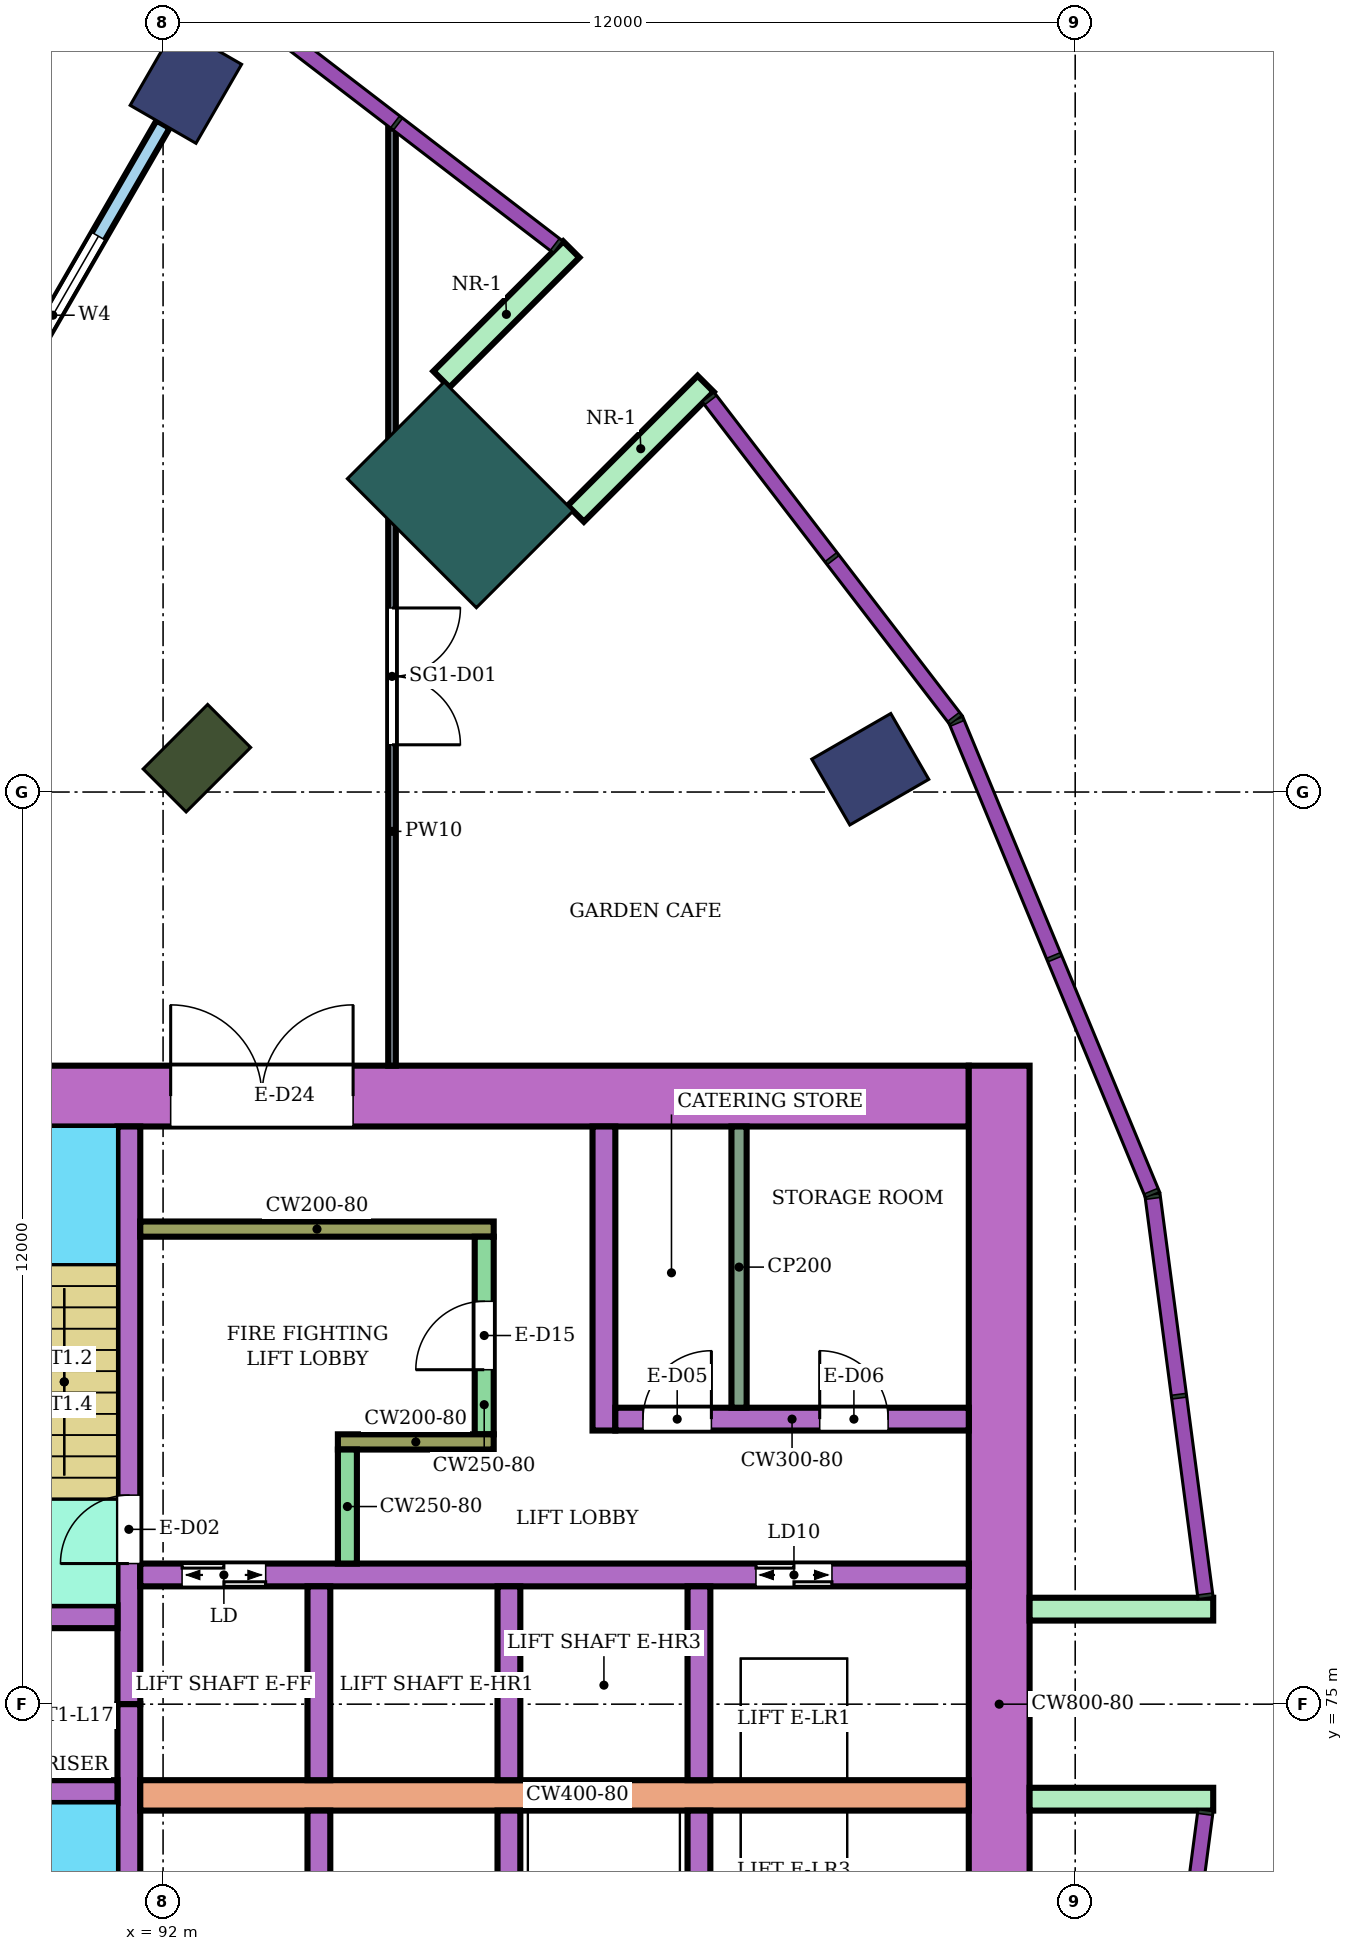
"""IFC4 building model, lengths in metres.
Left out: names, types, materials, properties, quantities, classifications, styles, units other than length and angle.
Written with IfcOpenShell. Run it as: python <this file> out.ifc"""

import sys

from ifc_helpers import new_model, si_unit, direction, frame, frame_2d, origin, origin_2d, place, context, subcontext, project, spatial, rectangle, extrude, element, fill, save


model = new_model("IFC4")
c1 = context("Model", 3, precision=1e-05, world=origin(), true_north=direction((0.0, 1.0)))
c2 = subcontext(c1, "Body", "Model", "MODEL_VIEW")
j1 = project(units=[si_unit("LENGTHUNIT", "METRE"), si_unit("PLANEANGLEUNIT", "RADIAN")], contexts=[c1])
p1 = place(None, origin())
s1 = spatial("IfcSite", under=j1, at=p1, CompositionType="ELEMENT")
p2 = place(p1, origin())
s2 = spatial("IfcBuilding", under=s1, at=p2, CompositionType="ELEMENT")
p3 = place(p2, frame((0.0, 0.0, 74.4)))
s3 = spatial("IfcBuildingStorey", under=s2, at=p3, CompositionType="ELEMENT", Elevation=74.4)
for number, where, z_axis, x_axis in (
    (1, (101.304, 87.3, 0.0), (0.0, 0.0, 1.0), (0.866, 0.5, 0.0)),
    (2, (92.3, 96.304, 0.0), (0.0, 0.0, 1.0), (0.5, 0.866, 0.0)),
):
    element("IfcColumn", number, at=place(p3, frame(where, z_axis=z_axis, x_axis=x_axis)), inside=s3, PredefinedType="COLUMN", context=c2, shape_type="SweptSolid", body=[
        extrude(rectangle(XDim=1.2, YDim=1.0, at=origin_2d()), origin(), (0.0, 0.0, 1.0), 8.0),
    ])
p4 = place(p3, frame((92.445, 87.445, 0.0), z_axis=(0.0, 0.0, 1.0), x_axis=(0.707106781187, 0.707106781187, 0.0)))
e3 = element("IfcColumn", 3, at=p4, inside=s3, PredefinedType="COLUMN", context=c2, shape_type="SweptSolid", body=[
    extrude(rectangle(XDim=1.2, YDim=0.8, at=origin_2d()), origin(), (0.0, 0.0, 1.0), 8.0),
])
p5 = place(p3, frame((95.91, 90.91, 0.0), z_axis=(0.0, 0.0, 1.0), x_axis=(0.707106781187, 0.707106781187, 0.0)))
e4 = element("IfcColumn", 4, at=p5, inside=s3, PredefinedType="COLUMN", context=c2, shape_type="SweptSolid", body=[
    extrude(rectangle(XDim=1.8, YDim=2.4, at=origin_2d()), origin(), (0.0, 0.0, 1.0), 8.0),
])
p6 = place(p3, frame((87.9, 83.0, 0.0), z_axis=(0.0, 0.0, 1.0), x_axis=(1.0, 0.0, 0.0)))
e5 = element("IfcWall", 5, at=p6, inside=s3, PredefinedType="SHEAR", context=c2, shape_type="SweptSolid", body=[
    extrude(rectangle(XDim=14.7, YDim=0.8, at=frame_2d((7.35, 0.0))), origin(), (0.0, 0.0, 1.0), 7.68),
])
p7 = place(p6, frame((4.2, 0.0, 0.0)))
e6 = element("IfcOpeningElement", 6, at=p7, cuts=e5, PredefinedType="OPENING", context=c2, shape_type="SweptSolid", body=[
    extrude(rectangle(XDim=2.4, YDim=2.4, at=frame_2d((1.2, 1.2))), frame((0.0, 0.41, 0.0), z_axis=(0.0, -1.0, 0.0), x_axis=(1.0, 0.0, 0.0)), (0.0, 0.0, 1.0), 0.82),
])
p8 = place(p3, frame((103.0, 66.6, 0.0), z_axis=(0.0, 0.0, 1.0), x_axis=(0.0, 1.0, 0.0)))
e7 = element("IfcWall", 7, at=p8, inside=s3, PredefinedType="SHEAR", context=c2, shape_type="SweptSolid", body=[
    extrude(rectangle(XDim=16.8, YDim=0.8, at=frame_2d((8.4, 0.0))), origin(), (0.0, 0.0, 1.0), 7.68),
])
p9 = place(p3, frame((91.55, 75.0, 0.0), z_axis=(0.0, 0.0, 1.0), x_axis=(0.0, 1.0, 0.0)))
e8 = element("IfcWall", 8, at=p9, inside=s3, PredefinedType="SHEAR", context=c2, shape_type="SweptSolid", body=[
    extrude(rectangle(XDim=7.6, YDim=0.3, at=frame_2d((3.8, 0.0))), origin(), (0.0, 0.0, 1.0), 7.68),
])
p10 = place(p9, frame((1.85, 0.0, 0.0)))
e9 = element("IfcOpeningElement", 9, at=p10, cuts=e8, PredefinedType="OPENING", context=c2, shape_type="SweptSolid", body=[
    extrude(rectangle(XDim=0.9, YDim=2.1, at=frame_2d((0.45, 1.05))), frame((0.0, 0.16, 0.0), z_axis=(0.0, -1.0, 0.0), x_axis=(1.0, 0.0, 0.0)), (0.0, 0.0, 1.0), 0.32),
])
p11 = place(p3, frame((91.55, 67.4, 0.0), z_axis=(0.0, 0.0, 1.0), x_axis=(0.0, 1.0, 0.0)))
e10 = element("IfcWall", 10, at=p11, inside=s3, PredefinedType="SHEAR", context=c2, shape_type="SweptSolid", body=[
    extrude(rectangle(XDim=7.6, YDim=0.3, at=frame_2d((3.8, 0.0))), origin(), (0.0, 0.0, 1.0), 7.68),
])
p12 = place(p11, frame((0.25, 0.0, 0.0)))
e11 = element("IfcOpeningElement", 11, at=p12, cuts=e10, PredefinedType="OPENING", context=c2, shape_type="SweptSolid", body=[
    extrude(rectangle(XDim=0.9, YDim=2.1, at=frame_2d((0.45, 1.05))), frame((0.0, 0.16, 0.0), z_axis=(0.0, -1.0, 0.0), x_axis=(1.0, 0.0, 0.0)), (0.0, 0.0, 1.0), 0.32),
])
p13 = place(p3, frame((88.35, 76.15, 0.0), z_axis=(0.0, 0.0, 1.0), x_axis=(1.0, 0.0, 0.0)))
e12 = element("IfcWall", 12, at=p13, inside=s3, PredefinedType="SHEAR", context=c2, shape_type="SweptSolid", body=[
    extrude(rectangle(XDim=3.05, YDim=0.3, at=frame_2d((1.525, 0.0))), origin(), (0.0, 0.0, 1.0), 7.68),
])
p14 = place(p13, frame((1.1, 0.0, 0.0)))
e13 = element("IfcOpeningElement", 13, at=p14, cuts=e12, PredefinedType="OPENING", context=c2, shape_type="SweptSolid", body=[
    extrude(rectangle(XDim=0.7, YDim=2.0, at=frame_2d((0.35, 1.0))), frame((0.0, 0.16, 0.0), z_axis=(0.0, -1.0, 0.0), x_axis=(1.0, 0.0, 0.0)), (0.0, 0.0, 1.0), 0.32),
])
p15 = place(p3, frame((88.35, 73.85, 0.0), z_axis=(0.0, 0.0, 1.0), x_axis=(1.0, 0.0, 0.0)))
e14 = element("IfcWall", 14, at=p15, inside=s3, PredefinedType="SHEAR", context=c2, shape_type="SweptSolid", body=[
    extrude(rectangle(XDim=3.05, YDim=0.3, at=frame_2d((1.525, 0.0))), origin(), (0.0, 0.0, 1.0), 7.68),
])
p16 = place(p3, frame((91.7, 76.7, 0.0), z_axis=(0.0, 0.0, 1.0), x_axis=(1.0, 0.0, 0.0)))
e15 = element("IfcWall", 15, at=p16, inside=s3, PredefinedType="SHEAR", context=c2, shape_type="SweptSolid", body=[
    extrude(rectangle(XDim=10.9, YDim=0.3, at=frame_2d((5.45, 0.0))), origin(), (0.0, 0.0, 1.0), 7.68),
])
p17 = place(p16, frame((0.55, 0.0, 0.0)))
e16 = element("IfcOpeningElement", 16, at=p17, cuts=e15, PredefinedType="OPENING", context=c2, shape_type="SweptSolid", body=[
    extrude(rectangle(XDim=1.1, YDim=2.1, at=frame_2d((0.55, 1.05))), frame((0.0, 0.16, 0.0), z_axis=(0.0, -1.0, 0.0), x_axis=(1.0, 0.0, 0.0)), (0.0, 0.0, 1.0), 0.32),
])
p18 = place(p16, frame((8.1, 0.0, 0.0)))
e17 = element("IfcOpeningElement", 17, at=p18, cuts=e15, PredefinedType="OPENING", context=c2, shape_type="SweptSolid", body=[
    extrude(rectangle(XDim=1.0, YDim=2.1, at=frame_2d((0.5, 1.05))), frame((0.0, 0.16, 0.0), z_axis=(0.0, -1.0, 0.0), x_axis=(1.0, 0.0, 0.0)), (0.0, 0.0, 1.0), 0.32),
])
p19 = place(p3, frame((91.7, 73.8, 0.0), z_axis=(0.0, 0.0, 1.0), x_axis=(1.0, 0.0, 0.0)))
e18 = element("IfcWall", 18, at=p19, inside=s3, PredefinedType="SHEAR", context=c2, shape_type="SweptSolid", body=[
    extrude(rectangle(XDim=10.9, YDim=0.4, at=frame_2d((5.45, 0.0))), origin(), (0.0, 0.0, 1.0), 7.68),
])
for number, where, z_axis, x_axis in (
    (19, (94.05, 74.0, 0.0), (0.0, 0.0, 1.0), (0.0, 1.0, 0.0)),
    (20, (96.55, 74.0, 0.0), (0.0, 0.0, 1.0), (0.0, 1.0, 0.0)),
    (21, (99.05, 74.0, 0.0), (0.0, 0.0, 1.0), (0.0, 1.0, 0.0)),
    (22, (94.05, 71.05, 0.0), (0.0, 0.0, 1.0), (0.0, 1.0, 0.0)),
    (23, (96.55, 71.05, 0.0), (0.0, 0.0, 1.0), (0.0, 1.0, 0.0)),
    (24, (99.05, 71.05, 0.0), (0.0, 0.0, 1.0), (0.0, 1.0, 0.0)),
):
    element("IfcWall", number, at=place(p3, frame(where, z_axis=z_axis, x_axis=x_axis)), inside=s3, PredefinedType="SHEAR", context=c2, shape_type="SweptSolid", body=[
        extrude(rectangle(XDim=2.55, YDim=0.3, at=frame_2d((1.275, 0.0))), origin(), (0.0, 0.0, 1.0), 7.68),
    ])
p20 = place(p3, frame((91.7, 81.25, 0.0), z_axis=(0.0, 0.0, 1.0), x_axis=(1.0, 0.0, 0.0)))
e25 = element("IfcWall", 25, at=p20, inside=s3, PredefinedType="SHEAR", context=c2, shape_type="SweptSolid", body=[
    extrude(rectangle(XDim=4.65, YDim=0.2, at=frame_2d((2.325, 0.0))), origin(), (0.0, 0.0, 1.0), 7.68),
])
p21 = place(p3, frame((96.225, 78.55, 0.0), z_axis=(0.0, 0.0, 1.0), x_axis=(0.0, 1.0, 0.0)))
e26 = element("IfcWall", 26, at=p21, inside=s3, PredefinedType="SHEAR", context=c2, shape_type="SweptSolid", body=[
    extrude(rectangle(XDim=2.6, YDim=0.25, at=frame_2d((1.3, 0.0))), origin(), (0.0, 0.0, 1.0), 7.68),
])
p22 = place(p21, frame((0.85, 0.0, 0.0)))
e27 = element("IfcOpeningElement", 27, at=p22, cuts=e26, PredefinedType="OPENING", context=c2, shape_type="SweptSolid", body=[
    extrude(rectangle(XDim=0.9, YDim=2.1, at=frame_2d((0.45, 1.05))), frame((0.0, 0.135, 0.0), z_axis=(0.0, -1.0, 0.0), x_axis=(1.0, 0.0, 0.0)), (0.0, 0.0, 1.0), 0.27),
])
p23 = place(p3, frame((94.3, 78.45, 0.0), z_axis=(0.0, 0.0, 1.0), x_axis=(1.0, 0.0, 0.0)))
e28 = element("IfcWall", 28, at=p23, inside=s3, PredefinedType="SHEAR", context=c2, shape_type="SweptSolid", body=[
    extrude(rectangle(XDim=2.05, YDim=0.2, at=frame_2d((1.025, 0.0))), origin(), (0.0, 0.0, 1.0), 7.68),
])
p24 = place(p3, frame((94.425, 76.85, 0.0), z_axis=(0.0, 0.0, 1.0), x_axis=(0.0, 1.0, 0.0)))
e29 = element("IfcWall", 29, at=p24, inside=s3, PredefinedType="SHEAR", context=c2, shape_type="SweptSolid", body=[
    extrude(rectangle(XDim=1.5, YDim=0.25, at=frame_2d((0.75, 0.0))), origin(), (0.0, 0.0, 1.0), 7.68),
])
p25 = place(p3, frame((97.8, 78.6, 0.0), z_axis=(0.0, 0.0, 1.0), x_axis=(0.0, 1.0, 0.0)))
e30 = element("IfcWall", 30, at=p25, inside=s3, PredefinedType="SHEAR", context=c2, shape_type="SweptSolid", body=[
    extrude(rectangle(XDim=4.0, YDim=0.3, at=frame_2d((2.0, 0.0))), origin(), (0.0, 0.0, 1.0), 7.68),
])
p26 = place(p3, frame((97.95, 78.75, 0.0), z_axis=(0.0, 0.0, 1.0), x_axis=(1.0, 0.0, 0.0)))
e31 = element("IfcWall", 31, at=p26, inside=s3, PredefinedType="SHEAR", context=c2, shape_type="SweptSolid", body=[
    extrude(rectangle(XDim=4.65, YDim=0.3, at=frame_2d((2.325, 0.0))), origin(), (0.0, 0.0, 1.0), 7.68),
])
p27 = place(p26, frame((0.364, 0.0, 0.0)))
e32 = element("IfcOpeningElement", 32, at=p27, cuts=e31, PredefinedType="OPENING", context=c2, shape_type="SweptSolid", body=[
    extrude(rectangle(XDim=0.9, YDim=2.1, at=frame_2d((0.45, 1.05))), frame((0.0, 0.16, 0.0), z_axis=(0.0, -1.0, 0.0), x_axis=(1.0, 0.0, 0.0)), (0.0, 0.0, 1.0), 0.32),
])
p28 = place(p26, frame((2.689, 0.0, 0.0)))
e33 = element("IfcOpeningElement", 33, at=p28, cuts=e31, PredefinedType="OPENING", context=c2, shape_type="SweptSolid", body=[
    extrude(rectangle(XDim=0.9, YDim=2.1, at=frame_2d((0.45, 1.05))), frame((0.0, 0.16, 0.0), z_axis=(0.0, -1.0, 0.0), x_axis=(1.0, 0.0, 0.0)), (0.0, 0.0, 1.0), 0.32),
])
for number, where, z_axis, x_axis in (
    (34, (103.4, 73.75, 0.0), (0.0, 0.0, 1.0), (1.0, 0.0, 0.0)),
    (35, (103.4, 76.25, 0.0), (0.0, 0.0, 1.0), (1.0, 0.0, 0.0)),
    (36, (97.43, 90.662, 0.0), (0.0, 0.0, 1.0), (0.707, 0.707, 0.0)),
    (37, (95.662, 92.43, 0.0), (0.0, 0.0, 1.0), (0.707, 0.707, 0.0)),
):
    element("IfcWall", number, at=place(p3, frame(where, z_axis=z_axis, x_axis=x_axis)), inside=s3, PredefinedType="NOTDEFINED", context=c2, shape_type="SweptSolid", body=[
        extrude(rectangle(XDim=2.416, YDim=0.3, at=frame_2d((1.208, 0.0))), origin(), (0.0, 0.0, 1.0), 8.0),
    ])
p29 = place(p3, frame((89.1, 90.762, 0.0), z_axis=(0.0, 0.0, 1.0), x_axis=(0.499987231761, 0.866032775405, 0.0)))
e38 = element("IfcWall", 38, at=p29, inside=s3, PredefinedType="NOTDEFINED", context=c2, shape_type="SweptSolid", body=[
    extrude(rectangle(XDim=5.8, YDim=0.2, at=frame_2d((2.9, 0.0))), origin(), (0.0, 0.0, 1.0), 8.0),
])
p30 = place(p29, frame((1.7, 0.0, 0.3)))
e39 = element("IfcOpeningElement", 39, at=p30, cuts=e38, PredefinedType="OPENING", context=c2, shape_type="SweptSolid", body=[
    extrude(rectangle(XDim=2.4, YDim=3.6, at=frame_2d((1.2, 1.8))), frame((0.0, 0.11, 0.0), z_axis=(0.0, -1.0, 0.0), x_axis=(1.0, 0.0, 0.0)), (0.0, 0.0, 1.0), 0.22),
])
p31 = place(p3, frame((95.012, 83.4, 0.0), z_axis=(0.0, 0.0, 1.0), x_axis=(0.0, 1.0, 0.0)))
e40 = element("IfcWall", 40, at=p31, inside=s3, PredefinedType="PARTITIONING", context=c2, shape_type="SweptSolid", body=[
    extrude(rectangle(XDim=12.33, YDim=0.1, at=frame_2d((6.165, 0.0))), origin(), (0.0, 0.0, 1.0), 7.55),
])
p32 = place(p31, frame((4.221, 0.0, 0.0)))
e41 = element("IfcOpeningElement", 41, at=p32, cuts=e40, PredefinedType="OPENING", context=c2, shape_type="SweptSolid", body=[
    extrude(rectangle(XDim=1.8, YDim=2.1, at=frame_2d((0.9, 1.05))), frame((0.0, 0.06, 0.0), z_axis=(0.0, -1.0, 0.0), x_axis=(1.0, 0.0, 0.0)), (0.0, 0.0, 1.0), 0.12),
])
p33 = place(p3, frame((99.577, 78.9, 0.0), z_axis=(0.0, 0.0, 1.0), x_axis=(0.0, 1.0, 0.0)))
e42 = element("IfcWall", 42, at=p33, inside=s3, PredefinedType="PARTITIONING", context=c2, shape_type="SweptSolid", body=[
    extrude(rectangle(XDim=3.7, YDim=0.2, at=frame_2d((1.85, 0.0))), origin(), (0.0, 0.0, 1.0), 7.68),
])
p34 = place(p30, origin())
e43 = element("IfcWindow", 43, at=p34, inside=s3, PartitioningType="SINGLE_PANEL", PredefinedType="WINDOW", context=c2, shape_type="SweptSolid", body=[
    extrude(rectangle(XDim=2.4, YDim=3.6, at=frame_2d((1.2, 1.8))), frame((0.0, 0.03, 0.0), z_axis=(0.0, -1.0, 0.0), x_axis=(1.0, 0.0, 0.0)), (0.0, 0.0, 1.0), 0.06),
])
fill(e39, e43)
p35 = place(p32, frame((1.8, 0.0, 0.0), z_axis=(0.0, 0.0, 1.0), x_axis=(-1.0, 0.0, 0.0)))
e44 = element("IfcDoor", 44, at=p35, inside=s3, OperationType="DOUBLE_DOOR_SINGLE_SWING", PredefinedType="DOOR", context=c2, shape_type="SweptSolid", body=[
    extrude(rectangle(XDim=1.8, YDim=2.1, at=frame_2d((0.9, 1.05))), frame((0.0, 0.025, 0.0), z_axis=(0.0, -1.0, 0.0), x_axis=(1.0, 0.0, 0.0)), (0.0, 0.0, 1.0), 0.05),
])
fill(e41, e44)
p36 = place(p10, origin())
e45 = element("IfcDoor", 45, at=p36, inside=s3, OperationType="SINGLE_SWING_LEFT", PredefinedType="DOOR", context=c2, shape_type="SweptSolid", body=[
    extrude(rectangle(XDim=0.9, YDim=2.1, at=frame_2d((0.45, 1.05))), frame((0.0, 0.025, 0.0), z_axis=(0.0, -1.0, 0.0), x_axis=(1.0, 0.0, 0.0)), (0.0, 0.0, 1.0), 0.05),
])
fill(e9, e45)
p37 = place(p17, origin())
e46 = element("IfcDoor", 46, at=p37, inside=s3, OperationType="DOUBLE_DOOR_SLIDING", PredefinedType="DOOR", context=c2, shape_type="SweptSolid", body=[
    extrude(rectangle(XDim=1.1, YDim=2.1, at=frame_2d((0.55, 1.05))), frame((0.0, 0.025, 0.0), z_axis=(0.0, -1.0, 0.0), x_axis=(1.0, 0.0, 0.0)), (0.0, 0.0, 1.0), 0.05),
])
fill(e16, e46)
p38 = place(p18, origin())
e47 = element("IfcDoor", 47, at=p38, inside=s3, OperationType="DOUBLE_DOOR_SLIDING", PredefinedType="DOOR", context=c2, shape_type="SweptSolid", body=[
    extrude(rectangle(XDim=1.0, YDim=2.1, at=frame_2d((0.5, 1.05))), frame((0.0, 0.025, 0.0), z_axis=(0.0, -1.0, 0.0), x_axis=(1.0, 0.0, 0.0)), (0.0, 0.0, 1.0), 0.05),
])
fill(e17, e47)
p39 = place(p22, origin())
e48 = element("IfcDoor", 48, at=p39, inside=s3, OperationType="SINGLE_SWING_LEFT", PredefinedType="DOOR", context=c2, shape_type="SweptSolid", body=[
    extrude(rectangle(XDim=0.9, YDim=2.1, at=frame_2d((0.45, 1.05))), frame((0.0, 0.025, 0.0), z_axis=(0.0, -1.0, 0.0), x_axis=(1.0, 0.0, 0.0)), (0.0, 0.0, 1.0), 0.05),
])
fill(e27, e48)
p40 = place(p27, origin())
e49 = element("IfcDoor", 49, at=p40, inside=s3, OperationType="SINGLE_SWING_RIGHT", PredefinedType="DOOR", context=c2, shape_type="SweptSolid", body=[
    extrude(rectangle(XDim=0.9, YDim=2.1, at=frame_2d((0.45, 1.05))), frame((0.0, 0.025, 0.0), z_axis=(0.0, -1.0, 0.0), x_axis=(1.0, 0.0, 0.0)), (0.0, 0.0, 1.0), 0.05),
])
fill(e32, e49)
p41 = place(p28, origin())
e50 = element("IfcDoor", 50, at=p41, inside=s3, OperationType="SINGLE_SWING_LEFT", PredefinedType="DOOR", context=c2, shape_type="SweptSolid", body=[
    extrude(rectangle(XDim=0.9, YDim=2.1, at=frame_2d((0.45, 1.05))), frame((0.0, 0.025, 0.0), z_axis=(0.0, -1.0, 0.0), x_axis=(1.0, 0.0, 0.0)), (0.0, 0.0, 1.0), 0.05),
])
fill(e33, e50)
p42 = place(p7, origin())
e51 = element("IfcDoor", 51, at=p42, inside=s3, OperationType="DOUBLE_DOOR_SINGLE_SWING", PredefinedType="DOOR", context=c2, shape_type="SweptSolid", body=[
    extrude(rectangle(XDim=2.4, YDim=2.4, at=frame_2d((1.2, 1.2))), frame((0.0, 0.025, 0.0), z_axis=(0.0, -1.0, 0.0), x_axis=(1.0, 0.0, 0.0)), (0.0, 0.0, 1.0), 0.05),
])
fill(e6, e51)
save(model, sys.argv[1])
